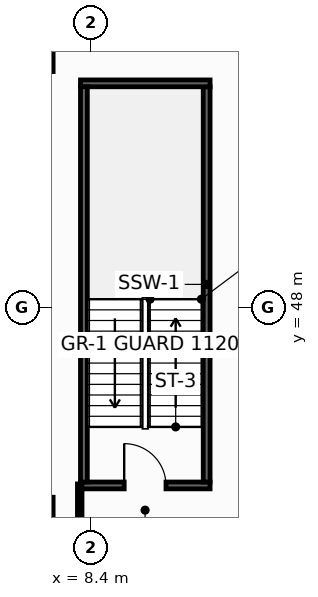
"""IFC4 building model, lengths in metres.
Left out: names, types, materials, properties, quantities, classifications, styles, units other than length and angle.
Written with IfcOpenShell. Run it as: python <this file> out.ifc"""

import sys

from ifc_helpers import new_model, si_unit, direction, frame, frame_2d, origin, origin_2d, place, context, subcontext, project, spatial, rectangle, hollow_rectangle, extrude, element, fill, save


model = new_model("IFC4")
c1 = context("Model", 3, precision=1e-05, world=origin(), true_north=direction((0.0, 1.0)))
c2 = subcontext(c1, "Body", "Model", "MODEL_VIEW")
j1 = project(units=[si_unit("LENGTHUNIT", "METRE"), si_unit("PLANEANGLEUNIT", "RADIAN")], contexts=[c1])
p1 = place(None, origin())
s1 = spatial("IfcSite", under=j1, at=p1, CompositionType="ELEMENT")
p2 = place(p1, origin())
s2 = spatial("IfcBuilding", under=s1, at=p2, CompositionType="ELEMENT")
p3 = place(p2, frame((0.0, 0.0, 51.6)))
s3 = spatial("IfcBuildingStorey", under=s2, at=p3, CompositionType="ELEMENT", Elevation=51.6)
for number, where, z_axis, x_axis in (
    (1, (6.8, 54.8, 0.0), (0.0, 0.0, 1.0), (1.0, 0.0, 0.0)),
    (2, (6.8, 42.4, 0.0), (0.0, 0.0, 1.0), (1.0, 0.0, 0.0)),
):
    element("IfcColumn", number, at=place(p3, frame(where, z_axis=z_axis, x_axis=x_axis)), inside=s3, PredefinedType="COLUMN", context=c2, shape_type="SweptSolid", body=[
        extrude(hollow_rectangle(XDim=1.2, YDim=1.2, WallThickness=0.055, at=origin_2d()), origin(), (0.0, 0.0, 1.0), 4.4),
    ])
p4 = place(p3, frame((8.12, 43.31, 0.0), z_axis=(0.0, 0.0, 1.0), x_axis=(1.0, 0.0, 0.0)))
e3 = element("IfcWall", 3, at=p4, inside=s3, PredefinedType="SHEAR", context=c2, shape_type="SweptSolid", body=[
    extrude(rectangle(XDim=3.41, YDim=0.18, at=frame_2d((1.705, 0.0))), origin(), (0.0, 0.0, 1.0), 4.15),
])
p5 = place(p4, frame((1.15, 0.0, 0.0)))
e4 = element("IfcOpeningElement", 4, at=p5, cuts=e3, PredefinedType="OPENING", context=c2, shape_type="SweptSolid", body=[
    extrude(rectangle(XDim=1.1, YDim=2.15, at=frame_2d((0.55, 1.075))), frame((0.0, 0.1, 0.0), z_axis=(0.0, -1.0, 0.0), x_axis=(1.0, 0.0, 0.0)), (0.0, 0.0, 1.0), 0.2),
])
p6 = place(p3, frame((11.44, 43.4, 0.0), z_axis=(0.0, 0.0, 1.0), x_axis=(0.0, 1.0, 0.0)))
e5 = element("IfcWall", 5, at=p6, inside=s3, PredefinedType="SHEAR", context=c2, shape_type="SweptSolid", body=[
    extrude(rectangle(XDim=10.4, YDim=0.18, at=frame_2d((5.2, 0.0))), origin(), (0.0, 0.0, 1.0), 4.15),
])
p7 = place(p3, frame((11.53, 53.89, 0.0), z_axis=(0.0, 0.0, 1.0), x_axis=(-1.0, 0.0, 0.0)))
e6 = element("IfcWall", 6, at=p7, inside=s3, PredefinedType="SHEAR", context=c2, shape_type="SweptSolid", body=[
    extrude(rectangle(XDim=3.41, YDim=0.18, at=frame_2d((1.705, 0.0))), origin(), (0.0, 0.0, 1.0), 4.15),
])
p8 = place(p3, frame((8.21, 53.8, 0.0), z_axis=(0.0, 0.0, 1.0), x_axis=(0.0, -1.0, 0.0)))
e7 = element("IfcWall", 7, at=p8, inside=s3, PredefinedType="SHEAR", context=c2, shape_type="SweptSolid", body=[
    extrude(rectangle(XDim=10.4, YDim=0.18, at=frame_2d((5.2, 0.0))), origin(), (0.0, 0.0, 1.0), 4.15),
])
p9 = place(p3, frame((8.1, 40.95, 0.0), z_axis=(0.0, 0.0, 1.0), x_axis=(0.0, 1.0, 0.0)))
e8 = element("IfcWall", 8, at=p9, inside=s3, PredefinedType="PARTITIONING", context=c2, shape_type="SweptSolid", body=[
    extrude(rectangle(XDim=2.4, YDim=0.12, at=frame_2d((1.2, 0.0))), origin(), (0.0, 0.0, 1.0), 3.335),
])
p10 = place(p5, origin())
e9 = element("IfcDoor", 9, at=p10, inside=s3, OperationType="SINGLE_SWING_LEFT", PredefinedType="DOOR", context=c2, shape_type="SweptSolid", body=[
    extrude(rectangle(XDim=1.1, YDim=2.15, at=frame_2d((0.55, 1.075))), frame((0.0, 0.025, 0.0), z_axis=(0.0, -1.0, 0.0), x_axis=(1.0, 0.0, 0.0)), (0.0, 0.0, 1.0), 0.05),
])
fill(e4, e9)
save(model, sys.argv[1])
